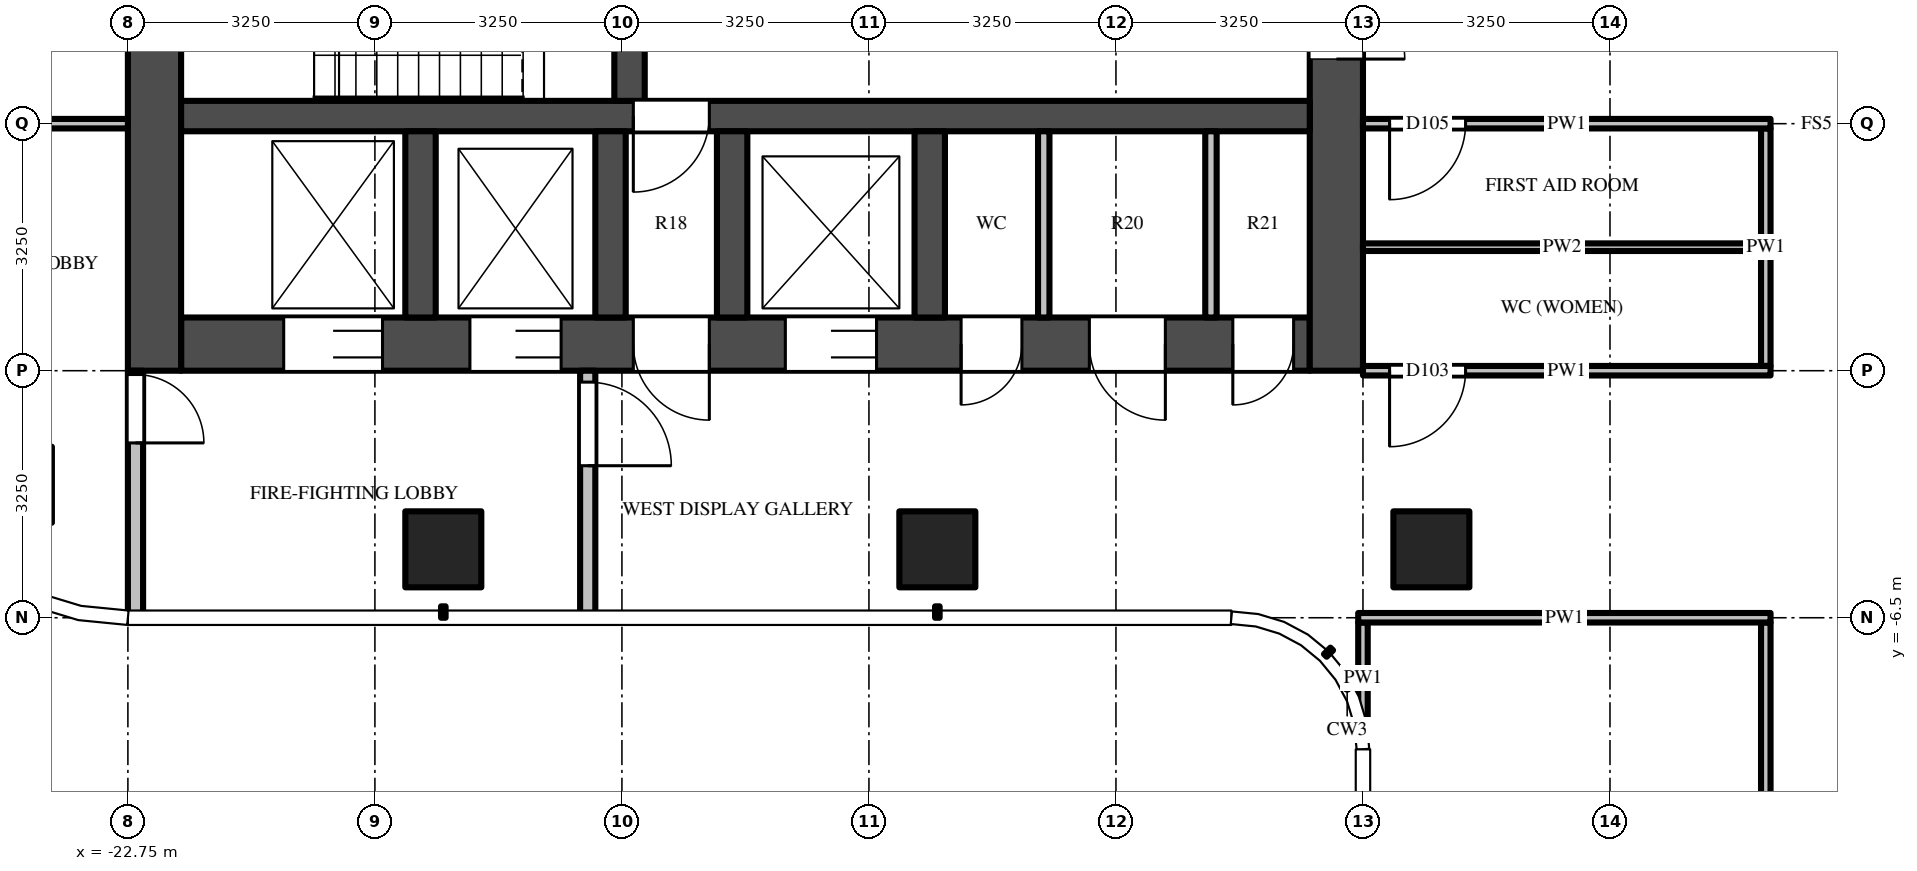
"""IFC4 building model, lengths in metres.
Left out: names, types, materials, properties, quantities, classifications, styles, units other than length and angle.
Written with IfcOpenShell. Run it as: python <this file> out.ifc"""

import sys

from ifc_helpers import new_model, si_unit, direction, frame, frame_2d, origin, origin_2d, place, context, subcontext, project, spatial, rectangle, extrude, source, transform, mapped, element, fill, save


model = new_model("IFC4")
c1 = context("Model", 3, precision=1e-05, world=origin(), true_north=direction((0.0, 1.0)))
c2 = subcontext(c1, "Body", "Model", "MODEL_VIEW")
j1 = project(units=[si_unit("LENGTHUNIT", "METRE"), si_unit("PLANEANGLEUNIT", "RADIAN")], contexts=[c1])
p1 = place(None, origin())
s1 = spatial("IfcSite", under=j1, at=p1, CompositionType="ELEMENT")
p2 = place(p1, origin())
s2 = spatial("IfcBuilding", under=s1, at=p2, CompositionType="ELEMENT")
p3 = place(p2, frame((0.0, 0.0, 298.9)))
s3 = spatial("IfcBuildingStorey", under=s2, at=p3, CompositionType="ELEMENT", Elevation=298.9)
m1 = source(origin(), c2, "Body", "SweptSolid", [
    extrude(rectangle(XDim=1.0, YDim=1.0, at=origin_2d()), origin(), (0.0, 0.0, 1.0), 3.9),
])
for number, where, z_axis, x_axis in (
    (1, (-5.6, -5.6, 0.0), (0.0, 0.0, 1.0), (1.0, 0.0, 0.0)),
    (2, (-12.1, -5.6, 0.0), (0.0, 0.0, 1.0), (1.0, 0.0, 0.0)),
    (3, (-18.6, -5.6, 0.0), (0.0, 0.0, 1.0), (1.0, 0.0, 0.0)),
):
    element("IfcColumn", number, at=place(p3, frame(where, z_axis=z_axis, x_axis=x_axis)), inside=s3, PredefinedType="COLUMN", context=c2, shape_type="MappedRepresentation", body=[
        mapped(m1, transform((0.0, 0.0, 0.0))),
    ])
m2 = source(origin(), c2, "Body", "SweptSolid", [
    extrude(rectangle(XDim=14.85, YDim=0.7, at=frame_2d((7.425, 0.0))), origin(), (0.0, 0.0, 1.0), 3.7),
])
p4 = place(p3, frame((-7.2, -2.9, 0.0), z_axis=(0.0, 0.0, 1.0), x_axis=(-1.0, 0.0, 0.0)))
e4 = element("IfcWall", 4, at=p4, inside=s3, PredefinedType="SHEAR", context=c2, shape_type="MappedRepresentation", body=[
    mapped(m2, transform((0.0, 0.0, 0.0))),
])
m3 = source(origin(), c2, "Body", "SweptSolid", [
    extrude(rectangle(XDim=1.2, YDim=2.1, at=frame_2d((0.6, 1.05))), frame((0.0, 0.36, 0.0), z_axis=(0.0, -1.0, 0.0), x_axis=(1.0, 0.0, 0.0)), (0.0, 0.0, 1.0), 0.72),
])
p5 = place(p4, frame((5.7, 0.0, 0.0)))
e5 = element("IfcOpeningElement", 5, at=p5, cuts=e4, PredefinedType="OPENING", context=c2, shape_type="MappedRepresentation", body=[
    mapped(m3, transform((0.0, 0.0, 0.0))),
])
m4 = source(origin(), c2, "Body", "SweptSolid", [
    extrude(rectangle(XDim=1.3, YDim=2.1, at=frame_2d((0.65, 1.05))), frame((0.0, 0.36, 0.0), z_axis=(0.0, -1.0, 0.0), x_axis=(1.0, 0.0, 0.0)), (0.0, 0.0, 1.0), 0.72),
])
p6 = place(p4, frame((12.2, 0.0, 0.0)))
e6 = element("IfcOpeningElement", 6, at=p6, cuts=e4, PredefinedType="OPENING", context=c2, shape_type="MappedRepresentation", body=[
    mapped(m4, transform((0.0, 0.0, 0.0))),
])
p7 = place(p4, frame((9.85, 0.0, 0.0)))
e7 = element("IfcOpeningElement", 7, at=p7, cuts=e4, PredefinedType="OPENING", context=c2, shape_type="MappedRepresentation", body=[
    mapped(m3, transform((0.0, 0.0, 0.0))),
])
m5 = source(origin(), c2, "Body", "SweptSolid", [
    extrude(rectangle(XDim=1.0, YDim=2.1, at=frame_2d((0.5, 1.05))), frame((0.0, 0.36, 0.0), z_axis=(0.0, -1.0, 0.0), x_axis=(1.0, 0.0, 0.0)), (0.0, 0.0, 1.0), 0.72),
])
p8 = place(p4, frame((7.9, 0.0, 0.0)))
e8 = element("IfcOpeningElement", 8, at=p8, cuts=e4, PredefinedType="OPENING", context=c2, shape_type="MappedRepresentation", body=[
    mapped(m5, transform((0.0, 0.0, 0.0))),
])
m6 = source(origin(), c2, "Body", "SweptSolid", [
    extrude(rectangle(XDim=0.8, YDim=2.1, at=frame_2d((0.4, 1.05))), frame((0.0, 0.36, 0.0), z_axis=(0.0, -1.0, 0.0), x_axis=(1.0, 0.0, 0.0)), (0.0, 0.0, 1.0), 0.72),
])
p9 = place(p4, frame((0.212, 0.0, 0.0)))
e9 = element("IfcOpeningElement", 9, at=p9, cuts=e4, PredefinedType="OPENING", context=c2, shape_type="MappedRepresentation", body=[
    mapped(m6, transform((0.0, 0.0, 0.0))),
])
p10 = place(p4, frame((1.9, 0.0, 0.0)))
e10 = element("IfcOpeningElement", 10, at=p10, cuts=e4, PredefinedType="OPENING", context=c2, shape_type="MappedRepresentation", body=[
    mapped(m5, transform((0.0, 0.0, 0.0))),
])
p11 = place(p4, frame((3.788, 0.0, 0.0)))
e11 = element("IfcOpeningElement", 11, at=p11, cuts=e4, PredefinedType="OPENING", context=c2, shape_type="MappedRepresentation", body=[
    mapped(m6, transform((0.0, 0.0, 0.0))),
])
m7 = source(origin(), c2, "Body", "SweptSolid", [
    extrude(rectangle(XDim=9.05, YDim=0.7, at=frame_2d((4.525, 0.0))), origin(), (0.0, 0.0, 1.0), 3.7),
])
p12 = place(p3, frame((-6.85, 5.8, 0.0), z_axis=(0.0, 0.0, 1.0), x_axis=(0.0, -1.0, 0.0)))
e12 = element("IfcWall", 12, at=p12, inside=s3, PredefinedType="SHEAR", context=c2, shape_type="MappedRepresentation", body=[
    mapped(m7, transform((0.0, 0.0, 0.0))),
])
m8 = source(origin(), c2, "Body", "SweptSolid", [
    extrude(rectangle(XDim=1.8, YDim=2.1, at=frame_2d((0.9, 1.05))), frame((0.0, 0.36, 0.0), z_axis=(0.0, -1.0, 0.0), x_axis=(1.0, 0.0, 0.0)), (0.0, 0.0, 1.0), 0.72),
])
p13 = place(p12, frame((3.15, 0.0, 0.0)))
e13 = element("IfcOpeningElement", 13, at=p13, cuts=e12, PredefinedType="OPENING", context=c2, shape_type="MappedRepresentation", body=[
    mapped(m8, transform((0.0, 0.0, 0.0))),
])
p14 = place(p3, frame((-22.4, 5.8, 0.0), z_axis=(0.0, 0.0, 1.0), x_axis=(0.0, -1.0, 0.0)))
e14 = element("IfcWall", 14, at=p14, inside=s3, PredefinedType="SHEAR", context=c2, shape_type="MappedRepresentation", body=[
    mapped(m7, transform((0.0, 0.0, 0.0))),
])
m9 = source(origin(), c2, "Body", "SweptSolid", [
    extrude(rectangle(XDim=14.85, YDim=0.4, at=frame_2d((7.425, 0.0))), origin(), (0.0, 0.0, 1.0), 3.7),
])
p15 = place(p3, frame((-7.2, 0.1, 0.0), z_axis=(0.0, 0.0, 1.0), x_axis=(-1.0, 0.0, 0.0)))
e15 = element("IfcWall", 15, at=p15, inside=s3, PredefinedType="SHEAR", context=c2, shape_type="MappedRepresentation", body=[
    mapped(m9, transform((0.0, 0.0, 0.0))),
])
m10 = source(origin(), c2, "Body", "SweptSolid", [
    extrude(rectangle(XDim=1.0, YDim=2.1, at=frame_2d((0.5, 1.05))), frame((0.0, 0.21, 0.0), z_axis=(0.0, -1.0, 0.0), x_axis=(1.0, 0.0, 0.0)), (0.0, 0.0, 1.0), 0.42),
])
p16 = place(p15, frame((7.9, 0.0, 0.0)))
e16 = element("IfcOpeningElement", 16, at=p16, cuts=e15, PredefinedType="OPENING", context=c2, shape_type="MappedRepresentation", body=[
    mapped(m10, transform((0.0, 0.0, 0.0))),
])
m11 = source(origin(), c2, "Body", "SweptSolid", [
    extrude(rectangle(XDim=5.5, YDim=0.4, at=frame_2d((2.75, 0.0))), origin(), (0.0, 0.0, 1.0), 3.7),
])
p17 = place(p3, frame((-16.15, 5.8, 0.0), z_axis=(0.0, 0.0, 1.0), x_axis=(0.0, -1.0, 0.0)))
e17 = element("IfcWall", 17, at=p17, inside=s3, PredefinedType="SHEAR", context=c2, shape_type="MappedRepresentation", body=[
    mapped(m11, transform((0.0, 0.0, 0.0))),
])
m12 = source(origin(), c2, "Body", "SweptSolid", [
    extrude(rectangle(XDim=1.1, YDim=2.1, at=frame_2d((0.55, 1.05))), frame((0.0, 0.21, 0.0), z_axis=(0.0, -1.0, 0.0), x_axis=(1.0, 0.0, 0.0)), (0.0, 0.0, 1.0), 0.42),
])
p18 = place(p17, frame((0.725, 0.0, 0.0)))
e18 = element("IfcOpeningElement", 18, at=p18, cuts=e17, PredefinedType="OPENING", context=c2, shape_type="MappedRepresentation", body=[
    mapped(m12, transform((0.0, 0.0, 0.0))),
])
p19 = place(p17, frame((3.675, 0.0, 0.0)))
e19 = element("IfcOpeningElement", 19, at=p19, cuts=e17, PredefinedType="OPENING", context=c2, shape_type="MappedRepresentation", body=[
    mapped(m12, transform((0.0, 0.0, 0.0))),
])
m13 = source(origin(), c2, "Body", "SweptSolid", [
    extrude(rectangle(XDim=2.45, YDim=0.4, at=frame_2d((1.225, 0.0))), origin(), (0.0, 0.0, 1.0), 3.7),
])
for number, where, z_axis, x_axis in (
    (20, (-12.2, -0.1, 0.0), (0.0, 0.0, 1.0), (0.0, -1.0, 0.0)),
    (21, (-14.8, -0.1, 0.0), (0.0, 0.0, 1.0), (0.0, -1.0, 0.0)),
    (22, (-16.4, -0.1, 0.0), (0.0, 0.0, 1.0), (0.0, -1.0, 0.0)),
    (23, (-18.9, -0.1, 0.0), (0.0, 0.0, 1.0), (0.0, -1.0, 0.0)),
):
    element("IfcWall", number, at=place(p3, frame(where, z_axis=z_axis, x_axis=x_axis)), inside=s3, PredefinedType="SHEAR", context=c2, shape_type="MappedRepresentation", body=[
        mapped(m13, transform((0.0, 0.0, 0.0))),
    ])
m14 = source(origin(), c2, "Body", "SweptSolid", [
    extrude(rectangle(XDim=3.25, YDim=0.2, at=frame_2d((1.625, 0.0))), origin(), (0.0, 0.0, 1.0), 3.7),
])
p20 = place(p3, frame((-16.7, -3.25, 0.0), z_axis=(0.0, 0.0, 1.0), x_axis=(0.0, -1.0, 0.0)))
e24 = element("IfcWall", 24, at=p20, inside=s3, PredefinedType="PARTITIONING", context=c2, shape_type="MappedRepresentation", body=[
    mapped(m14, transform((0.0, 0.0, 0.0))),
])
m15 = source(origin(), c2, "Body", "SweptSolid", [
    extrude(rectangle(XDim=1.1, YDim=2.1, at=frame_2d((0.55, 1.05))), frame((0.0, 0.11, 0.0), z_axis=(0.0, -1.0, 0.0), x_axis=(1.0, 0.0, 0.0)), (0.0, 0.0, 1.0), 0.22),
])
p21 = place(p20, frame((0.15, 0.0, 0.0)))
e25 = element("IfcOpeningElement", 25, at=p21, cuts=e24, PredefinedType="OPENING", context=c2, shape_type="MappedRepresentation", body=[
    mapped(m15, transform((0.0, 0.0, 0.0))),
])
p22 = place(p3, frame((-22.65, -3.25, 0.0), z_axis=(0.0, 0.0, 1.0), x_axis=(0.0, -1.0, 0.0)))
e26 = element("IfcWall", 26, at=p22, inside=s3, PredefinedType="PARTITIONING", context=c2, shape_type="MappedRepresentation", body=[
    mapped(m14, transform((0.0, 0.0, 0.0))),
])
m16 = source(origin(), c2, "Body", "SweptSolid", [
    extrude(rectangle(XDim=0.9, YDim=2.1, at=frame_2d((0.45, 1.05))), frame((0.0, 0.11, 0.0), z_axis=(0.0, -1.0, 0.0), x_axis=(1.0, 0.0, 0.0)), (0.0, 0.0, 1.0), 0.22),
])
p23 = place(p22, frame((0.05, 0.0, 0.0)))
e27 = element("IfcOpeningElement", 27, at=p23, cuts=e26, PredefinedType="OPENING", context=c2, shape_type="MappedRepresentation", body=[
    mapped(m16, transform((0.0, 0.0, 0.0))),
])
m17 = source(origin(), c2, "Body", "SweptSolid", [
    extrude(rectangle(XDim=2.45, YDim=0.15, at=frame_2d((1.225, 0.0))), origin(), (0.0, 0.0, 1.0), 3.7),
])
for number, where, z_axis, x_axis in (
    (28, (-8.5, -0.1, 0.0), (0.0, 0.0, 1.0), (0.0, -1.0, 0.0)),
    (29, (-10.7, -0.1, 0.0), (0.0, 0.0, 1.0), (0.0, -1.0, 0.0)),
):
    element("IfcWall", number, at=place(p3, frame(where, z_axis=z_axis, x_axis=x_axis)), inside=s3, PredefinedType="PARTITIONING", context=c2, shape_type="MappedRepresentation", body=[
        mapped(m17, transform((0.0, 0.0, 0.0))),
    ])
m18 = source(origin(), c2, "Body", "SweptSolid", [
    extrude(rectangle(XDim=1.469, YDim=0.125, at=frame_2d((0.734, 0.0))), origin(), (0.0, 0.0, 1.0), 3.7),
])
p24 = place(p3, frame((-6.5, -6.562, 0.0), z_axis=(0.0, 0.0, 1.0), x_axis=(0.0, -1.0, 0.0)))
e30 = element("IfcWall", 30, at=p24, inside=s3, PredefinedType="PARTITIONING", context=c2, shape_type="MappedRepresentation", body=[
    mapped(m18, transform((0.0, 0.0, 0.0))),
])
m19 = source(origin(), c2, "Body", "SweptSolid", [
    extrude(rectangle(XDim=5.475, YDim=0.125, at=frame_2d((2.738, 0.0))), origin(), (0.0, 0.0, 1.0), 2.997),
])
p25 = place(p3, frame((-1.2, -6.562, 0.0), z_axis=(0.0, 0.0, 1.0), x_axis=(0.0, -1.0, 0.0)))
e31 = element("IfcWall", 31, at=p25, inside=s3, PredefinedType="PARTITIONING", context=c2, shape_type="MappedRepresentation", body=[
    mapped(m19, transform((0.0, 0.0, 0.0))),
])
m20 = source(origin(), c2, "Body", "SweptSolid", [
    extrude(rectangle(XDim=1.2, YDim=2.1, at=frame_2d((0.6, 1.05))), frame((0.0, 0.073, 0.0), z_axis=(0.0, -1.0, 0.0), x_axis=(1.0, 0.0, 0.0)), (0.0, 0.0, 1.0), 0.145),
])
p26 = place(p25, frame((3.988, 0.0, 0.0)))
e32 = element("IfcOpeningElement", 32, at=p26, cuts=e31, PredefinedType="OPENING", context=c2, shape_type="MappedRepresentation", body=[
    mapped(m20, transform((0.0, 0.0, 0.0))),
])
m21 = source(origin(), c2, "Body", "SweptSolid", [
    extrude(rectangle(XDim=3.125, YDim=0.125, at=frame_2d((1.562, 0.0))), origin(), (0.0, 0.0, 1.0), 3.068),
])
p27 = place(p3, frame((-1.2, -0.062, 0.0), z_axis=(0.0, 0.0, 1.0), x_axis=(0.0, -1.0, 0.0)))
e33 = element("IfcWall", 33, at=p27, inside=s3, PredefinedType="PARTITIONING", context=c2, shape_type="MappedRepresentation", body=[
    mapped(m21, transform((0.0, 0.0, 0.0))),
])
m22 = source(origin(), c2, "Body", "SweptSolid", [
    extrude(rectangle(XDim=5.425, YDim=0.125, at=frame_2d((2.712, 0.0))), origin(), (0.0, 0.0, 1.0), 2.78),
])
p28 = place(p3, frame((-1.137, -6.5, 0.0), z_axis=(0.0, 0.0, 1.0), x_axis=(-1.0, 0.0, 0.0)))
e34 = element("IfcWall", 34, at=p28, inside=s3, PredefinedType="PARTITIONING", context=c2, shape_type="MappedRepresentation", body=[
    mapped(m22, transform((0.0, 0.0, 0.0))),
])
m23 = source(origin(), c2, "Body", "SweptSolid", [
    extrude(rectangle(XDim=5.363, YDim=0.125, at=frame_2d((2.681, 0.0))), origin(), (0.0, 0.0, 1.0), 2.997),
])
p29 = place(p3, frame((-1.137, -3.25, 0.0), z_axis=(0.0, 0.0, 1.0), x_axis=(-1.0, 0.0, 0.0)))
e35 = element("IfcWall", 35, at=p29, inside=s3, PredefinedType="PARTITIONING", context=c2, shape_type="MappedRepresentation", body=[
    mapped(m23, transform((0.0, 0.0, 0.0))),
])
m24 = source(origin(), c2, "Body", "SweptSolid", [
    extrude(rectangle(XDim=1.0, YDim=2.1, at=frame_2d((0.5, 1.05))), frame((0.0, 0.073, 0.0), z_axis=(0.0, -1.0, 0.0), x_axis=(1.0, 0.0, 0.0)), (0.0, 0.0, 1.0), 0.145),
])
p30 = place(p29, frame((4.012, 0.0, 0.0)))
e36 = element("IfcOpeningElement", 36, at=p30, cuts=e35, PredefinedType="OPENING", context=c2, shape_type="MappedRepresentation", body=[
    mapped(m24, transform((0.0, 0.0, 0.0))),
])
m25 = source(origin(), c2, "Body", "SweptSolid", [
    extrude(rectangle(XDim=5.238, YDim=0.1, at=frame_2d((2.619, 0.0))), origin(), (0.0, 0.0, 1.0), 2.997),
])
p31 = place(p3, frame((-6.5, -1.625, 0.0), z_axis=(0.0, 0.0, 1.0), x_axis=(1.0, 0.0, 0.0)))
e37 = element("IfcWall", 37, at=p31, inside=s3, PredefinedType="PARTITIONING", context=c2, shape_type="MappedRepresentation", body=[
    mapped(m25, transform((0.0, 0.0, 0.0))),
])
p32 = place(p3, frame((-1.137, 0.0, 0.0), z_axis=(0.0, 0.0, 1.0), x_axis=(-1.0, 0.0, 0.0)))
e38 = element("IfcWall", 38, at=p32, inside=s3, PredefinedType="PARTITIONING", context=c2, shape_type="MappedRepresentation", body=[
    mapped(m23, transform((0.0, 0.0, 0.0))),
])
p33 = place(p32, frame((4.012, 0.0, 0.0)))
e39 = element("IfcOpeningElement", 39, at=p33, cuts=e38, PredefinedType="OPENING", context=c2, shape_type="MappedRepresentation", body=[
    mapped(m24, transform((0.0, 0.0, 0.0))),
])
m26 = source(origin(), c2, "Body", "SweptSolid", [
    extrude(rectangle(XDim=3.05, YDim=0.125, at=frame_2d((1.525, 0.0))), origin(), (0.0, 0.0, 1.0), 2.78),
])
p34 = place(p3, frame((-25.8, 0.0, 0.0), z_axis=(0.0, 0.0, 1.0), x_axis=(1.0, 0.0, 0.0)))
e40 = element("IfcWall", 40, at=p34, inside=s3, PredefinedType="PARTITIONING", context=c2, shape_type="MappedRepresentation", body=[
    mapped(m26, transform((0.0, 0.0, 0.0))),
])
p35 = place(p34, frame((0.15, 0.0, 0.0)))
e41 = element("IfcOpeningElement", 41, at=p35, cuts=e40, PredefinedType="OPENING", context=c2, shape_type="MappedRepresentation", body=[
    mapped(m24, transform((0.0, 0.0, 0.0))),
])
m27 = source(origin(), c2, "Body", "SweptSolid", [
    extrude(rectangle(XDim=1.2, YDim=2.1, at=frame_2d((0.6, 1.05))), frame((0.0, -0.275, 0.0), z_axis=(0.0, -1.0, 0.0), x_axis=(1.0, 0.0, 0.0)), (0.0, 0.0, 1.0), 0.05),
])
p36 = place(p5, origin())
e42 = element("IfcDoor", 42, at=p36, inside=s3, OperationType="DOUBLE_DOOR_SLIDING", PredefinedType="DOOR", context=c2, shape_type="MappedRepresentation", body=[
    mapped(m27, transform((0.0, 0.0, 0.0))),
])
fill(e5, e42)
m28 = source(origin(), c2, "Body", "SweptSolid", [
    extrude(rectangle(XDim=1.3, YDim=2.1, at=frame_2d((0.65, 1.05))), frame((0.0, -0.275, 0.0), z_axis=(0.0, -1.0, 0.0), x_axis=(1.0, 0.0, 0.0)), (0.0, 0.0, 1.0), 0.05),
])
p37 = place(p6, origin())
e43 = element("IfcDoor", 43, at=p37, inside=s3, OperationType="DOUBLE_DOOR_SLIDING", PredefinedType="DOOR", context=c2, shape_type="MappedRepresentation", body=[
    mapped(m28, transform((0.0, 0.0, 0.0))),
])
fill(e6, e43)
p38 = place(p7, origin())
e44 = element("IfcDoor", 44, at=p38, inside=s3, OperationType="DOUBLE_DOOR_SLIDING", PredefinedType="DOOR", context=c2, shape_type="MappedRepresentation", body=[
    mapped(m27, transform((0.0, 0.0, 0.0))),
])
fill(e7, e44)
m29 = source(origin(), c2, "Body", "SweptSolid", [
    extrude(rectangle(XDim=1.8, YDim=2.1, at=frame_2d((0.9, 1.05))), frame((0.0, -0.275, 0.0), z_axis=(0.0, -1.0, 0.0), x_axis=(1.0, 0.0, 0.0)), (0.0, 0.0, 1.0), 0.05),
])
p39 = place(p13, origin())
e45 = element("IfcDoor", 45, at=p39, inside=s3, OperationType="DOUBLE_DOOR_SINGLE_SWING", PredefinedType="DOOR", context=c2, shape_type="MappedRepresentation", body=[
    mapped(m29, transform((0.0, 0.0, 0.0))),
])
fill(e13, e45)
m30 = source(origin(), c2, "Body", "SweptSolid", [
    extrude(rectangle(XDim=1.0, YDim=2.1, at=frame_2d((0.5, 1.05))), frame((0.0, 0.025, 0.0), z_axis=(0.0, -1.0, 0.0), x_axis=(1.0, 0.0, 0.0)), (0.0, 0.0, 1.0), 0.05),
])
p40 = place(p16, origin())
e46 = element("IfcDoor", 46, at=p40, inside=s3, OperationType="SINGLE_SWING_RIGHT", PredefinedType="DOOR", context=c2, shape_type="MappedRepresentation", body=[
    mapped(m30, transform((0.0, 0.0, 0.0))),
])
fill(e16, e46)
m31 = source(origin(), c2, "Body", "SweptSolid", [
    extrude(rectangle(XDim=1.0, YDim=2.1, at=frame_2d((0.5, 1.05))), frame((0.0, -0.275, 0.0), z_axis=(0.0, -1.0, 0.0), x_axis=(1.0, 0.0, 0.0)), (0.0, 0.0, 1.0), 0.05),
])
p41 = place(p8, origin())
e47 = element("IfcDoor", 47, at=p41, inside=s3, OperationType="SINGLE_SWING_LEFT", PredefinedType="DOOR", context=c2, shape_type="MappedRepresentation", body=[
    mapped(m31, transform((0.0, 0.0, 0.0))),
])
fill(e8, e47)
m32 = source(origin(), c2, "Body", "SweptSolid", [
    extrude(rectangle(XDim=1.1, YDim=2.1, at=frame_2d((0.55, 1.05))), frame((0.0, 0.025, 0.0), z_axis=(0.0, -1.0, 0.0), x_axis=(1.0, 0.0, 0.0)), (0.0, 0.0, 1.0), 0.05),
])
p42 = place(p21, origin())
e48 = element("IfcDoor", 48, at=p42, inside=s3, OperationType="SINGLE_SWING_RIGHT", PredefinedType="DOOR", context=c2, shape_type="MappedRepresentation", body=[
    mapped(m32, transform((0.0, 0.0, 0.0))),
])
fill(e25, e48)
m33 = source(origin(), c2, "Body", "SweptSolid", [
    extrude(rectangle(XDim=0.9, YDim=2.1, at=frame_2d((0.45, 1.05))), frame((0.0, 0.025, 0.0), z_axis=(0.0, -1.0, 0.0), x_axis=(1.0, 0.0, 0.0)), (0.0, 0.0, 1.0), 0.05),
])
p43 = place(p23, origin())
e49 = element("IfcDoor", 49, at=p43, inside=s3, OperationType="SINGLE_SWING_RIGHT", PredefinedType="DOOR", context=c2, shape_type="MappedRepresentation", body=[
    mapped(m33, transform((0.0, 0.0, 0.0))),
])
fill(e27, e49)
m34 = source(origin(), c2, "Body", "SweptSolid", [
    extrude(rectangle(XDim=0.8, YDim=2.1, at=frame_2d((0.4, 1.05))), frame((0.0, -0.275, 0.0), z_axis=(0.0, -1.0, 0.0), x_axis=(1.0, 0.0, 0.0)), (0.0, 0.0, 1.0), 0.05),
])
p44 = place(p9, origin())
e50 = element("IfcDoor", 50, at=p44, inside=s3, OperationType="SINGLE_SWING_RIGHT", PredefinedType="DOOR", context=c2, shape_type="MappedRepresentation", body=[
    mapped(m34, transform((0.0, 0.0, 0.0))),
])
fill(e9, e50)
p45 = place(p10, origin())
e51 = element("IfcDoor", 51, at=p45, inside=s3, OperationType="SINGLE_SWING_LEFT", PredefinedType="DOOR", context=c2, shape_type="MappedRepresentation", body=[
    mapped(m31, transform((0.0, 0.0, 0.0))),
])
fill(e10, e51)
p46 = place(p11, origin())
e52 = element("IfcDoor", 52, at=p46, inside=s3, OperationType="SINGLE_SWING_RIGHT", PredefinedType="DOOR", context=c2, shape_type="MappedRepresentation", body=[
    mapped(m34, transform((0.0, 0.0, 0.0))),
])
fill(e11, e52)
p47 = place(p30, origin())
e53 = element("IfcDoor", 53, at=p47, inside=s3, OperationType="SINGLE_SWING_RIGHT", PredefinedType="DOOR", context=c2, shape_type="MappedRepresentation", body=[
    mapped(m30, transform((0.0, 0.0, 0.0))),
])
fill(e36, e53)
p48 = place(p33, origin())
e54 = element("IfcDoor", 54, at=p48, inside=s3, OperationType="SINGLE_SWING_RIGHT", PredefinedType="DOOR", context=c2, shape_type="MappedRepresentation", body=[
    mapped(m30, transform((0.0, 0.0, 0.0))),
])
fill(e39, e54)
save(model, sys.argv[1])
